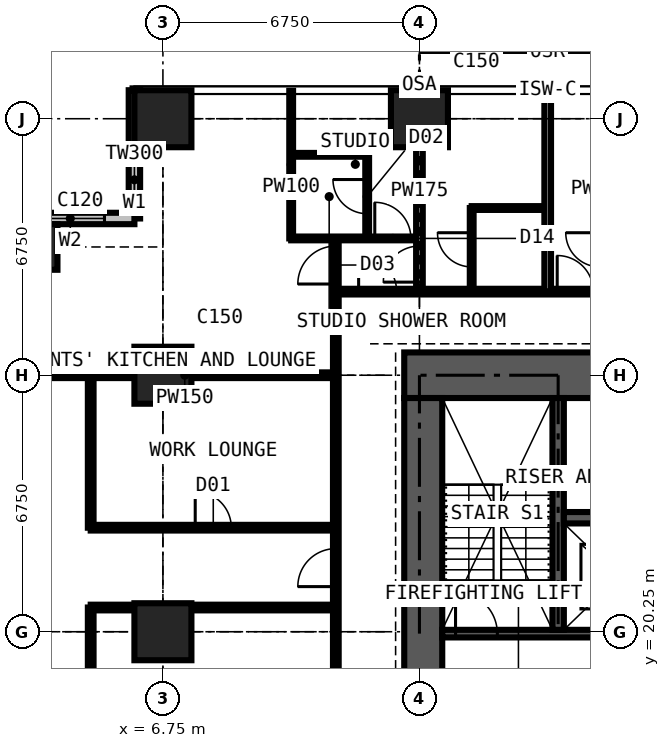
"""IFC4 building model, lengths in metres.
Left out: names, types, materials, properties, quantities, classifications, styles, units other than length and angle.
Written with IfcOpenShell. Run it as: python <this file> out.ifc"""

import sys

from ifc_helpers import new_model, si_unit, direction, frame, frame_2d, origin, origin_2d, place, context, subcontext, project, spatial, rectangle, extrude, element, fill, save


model = new_model("IFC4")
c1 = context("Model", 3, precision=1e-05, world=origin(), true_north=direction((0.0, 1.0)))
c2 = subcontext(c1, "Body", "Model", "MODEL_VIEW")
j1 = project(units=[si_unit("LENGTHUNIT", "METRE"), si_unit("PLANEANGLEUNIT", "RADIAN")], contexts=[c1])
p1 = place(None, origin())
s1 = spatial("IfcSite", under=j1, at=p1, CompositionType="ELEMENT")
p2 = place(p1, origin())
s2 = spatial("IfcBuilding", under=s1, at=p2, CompositionType="ELEMENT")
p3 = place(p2, frame((0.0, 0.0, 167.4)))
s3 = spatial("IfcBuildingStorey", under=s2, at=p3, CompositionType="ELEMENT", Elevation=167.4)
p4 = place(p3, frame((3.375, 30.375, 0.0), z_axis=(0.0, 0.0, 1.0), x_axis=(1.0, 0.0, 0.0)))
e1 = element("IfcColumn", 1, at=p4, inside=s3, PredefinedType="COLUMN", context=c2, shape_type="SweptSolid", body=[
    extrude(rectangle(XDim=1.2, YDim=1.2, at=origin_2d()), origin(), (0.0, 0.0, 1.0), 3.6),
])
for number, where, z_axis, x_axis in (
    (2, (6.75, 20.25, 0.0), (0.0, 0.0, 1.0), (1.0, 0.0, 0.0)),
    (3, (6.75, 27.0, 0.0), (0.0, 0.0, 1.0), (1.0, 0.0, 0.0)),
    (4, (6.75, 33.75, 0.0), (0.0, 0.0, 1.0), (1.0, 0.0, 0.0)),
    (5, (13.5, 33.75, 0.0), (0.0, 0.0, 1.0), (1.0, 0.0, 0.0)),
):
    element("IfcColumn", number, at=place(p3, frame(where, z_axis=z_axis, x_axis=x_axis)), inside=s3, PredefinedType="COLUMN", context=c2, shape_type="SweptSolid", body=[
        extrude(rectangle(XDim=1.5, YDim=1.5, at=origin_2d()), origin(), (0.0, 0.0, 1.0), 3.6),
    ])
p5 = place(p3, frame((27.4, 27.0, 0.0), z_axis=(0.0, 0.0, 1.0), x_axis=(-1.0, 0.0, 0.0)))
e6 = element("IfcWall", 6, at=p5, inside=s3, PredefinedType="SHEAR", context=c2, shape_type="SweptSolid", body=[
    extrude(rectangle(XDim=14.3, YDim=1.2, at=frame_2d((7.15, 0.0))), origin(), (0.0, 0.0, 1.0), 3.6),
])
p6 = place(p5, frame((4.55, 0.0, 0.0)))
e7 = element("IfcOpeningElement", 7, at=p6, cuts=e6, PredefinedType="OPENING", context=c2, shape_type="SweptSolid", body=[
    extrude(rectangle(XDim=0.9, YDim=2.2, at=frame_2d((0.45, 1.1))), frame((0.0, 0.61, 0.0), z_axis=(0.0, -1.0, 0.0), x_axis=(1.0, 0.0, 0.0)), (0.0, 0.0, 1.0), 1.22),
])
p7 = place(p5, frame((7.525, 0.0, 0.0)))
e8 = element("IfcOpeningElement", 8, at=p7, cuts=e6, PredefinedType="OPENING", context=c2, shape_type="SweptSolid", body=[
    extrude(rectangle(XDim=1.0, YDim=2.2, at=frame_2d((0.5, 1.1))), frame((0.0, 0.61, 0.0), z_axis=(0.0, -1.0, 0.0), x_axis=(1.0, 0.0, 0.0)), (0.0, 0.0, 1.0), 1.22),
])
p8 = place(p3, frame((13.6, 26.4, 0.0), z_axis=(0.0, 0.0, 1.0), x_axis=(0.0, -1.0, 0.0)))
e9 = element("IfcWall", 9, at=p8, inside=s3, PredefinedType="SHEAR", context=c2, shape_type="SweptSolid", body=[
    extrude(rectangle(XDim=12.3, YDim=1.0, at=frame_2d((6.15, 0.0))), origin(), (0.0, 0.0, 1.0), 3.6),
])
p9 = place(p8, frame((7.45, 0.0, 0.0)))
e10 = element("IfcOpeningElement", 10, at=p9, cuts=e9, PredefinedType="OPENING", context=c2, shape_type="SweptSolid", body=[
    extrude(rectangle(XDim=1.2, YDim=2.2, at=frame_2d((0.6, 1.1))), frame((0.0, 0.51, 0.0), z_axis=(0.0, -1.0, 0.0), x_axis=(1.0, 0.0, 0.0)), (0.0, 0.0, 1.0), 1.02),
])
p10 = place(p3, frame((6.0, 34.5, 0.0), z_axis=(0.0, 0.0, 1.0), x_axis=(0.0, -1.0, 0.0)))
e11 = element("IfcWall", 11, at=p10, inside=s3, PredefinedType="SOLIDWALL", context=c2, shape_type="SweptSolid", body=[
    extrude(rectangle(XDim=3.375, YDim=0.3, at=frame_2d((1.688, 0.0))), origin(), (0.0, 0.0, 1.0), 3.375),
])
p11 = place(p10, frame((1.607, 0.0, 0.9)))
e12 = element("IfcOpeningElement", 12, at=p11, cuts=e11, PredefinedType="OPENING", context=c2, shape_type="SweptSolid", body=[
    extrude(rectangle(XDim=1.5, YDim=1.8, at=frame_2d((0.75, 0.9))), frame((0.0, 0.16, 0.0), z_axis=(0.0, -1.0, 0.0), x_axis=(1.0, 0.0, 0.0)), (0.0, 0.0, 1.0), 0.32),
])
p12 = place(p3, frame((6.0, 31.125, 0.0), z_axis=(0.0, 0.0, 1.0), x_axis=(-1.0, 0.0, 0.0)))
e13 = element("IfcWall", 13, at=p12, inside=s3, PredefinedType="SOLIDWALL", context=c2, shape_type="SweptSolid", body=[
    extrude(rectangle(XDim=3.375, YDim=0.3, at=frame_2d((1.688, 0.0))), origin(), (0.0, 0.0, 1.0), 3.375),
])
p13 = place(p12, frame((0.788, 0.0, 0.6)))
e14 = element("IfcOpeningElement", 14, at=p13, cuts=e13, PredefinedType="OPENING", context=c2, shape_type="SweptSolid", body=[
    extrude(rectangle(XDim=1.8, YDim=2.1, at=frame_2d((0.9, 1.05))), frame((0.0, 0.16, 0.0), z_axis=(0.0, -1.0, 0.0), x_axis=(1.0, 0.0, 0.0)), (0.0, 0.0, 1.0), 0.32),
])
p14 = place(p3, frame((14.1, 20.2, 0.0), z_axis=(0.0, 0.0, 1.0), x_axis=(1.0, 0.0, 0.0)))
e15 = element("IfcWall", 15, at=p14, inside=s3, PredefinedType="SHEAR", context=c2, shape_type="SweptSolid", body=[
    extrude(rectangle(XDim=12.3, YDim=0.2, at=frame_2d((6.15, 0.0))), origin(), (0.0, 0.0, 1.0), 3.6),
])
p15 = place(p14, frame((4.56, 0.0, 0.0)))
e16 = element("IfcOpeningElement", 16, at=p15, cuts=e15, PredefinedType="OPENING", context=c2, shape_type="SweptSolid", body=[
    extrude(rectangle(XDim=1.1, YDim=2.2, at=frame_2d((0.55, 1.1))), frame((0.0, 0.11, 0.0), z_axis=(0.0, -1.0, 0.0), x_axis=(1.0, 0.0, 0.0)), (0.0, 0.0, 1.0), 0.22),
])
p16 = place(p14, frame((6.7, 0.0, 0.0)))
e17 = element("IfcOpeningElement", 17, at=p16, cuts=e15, PredefinedType="OPENING", context=c2, shape_type="SweptSolid", body=[
    extrude(rectangle(XDim=1.1, YDim=2.2, at=frame_2d((0.55, 1.1))), frame((0.0, 0.11, 0.0), z_axis=(0.0, -1.0, 0.0), x_axis=(1.0, 0.0, 0.0)), (0.0, 0.0, 1.0), 0.22),
])
p17 = place(p14, frame((0.35, 0.0, 0.0)))
e18 = element("IfcOpeningElement", 18, at=p17, cuts=e15, PredefinedType="OPENING", context=c2, shape_type="SweptSolid", body=[
    extrude(rectangle(XDim=1.1, YDim=2.2, at=frame_2d((0.55, 1.1))), frame((0.0, 0.11, 0.0), z_axis=(0.0, -1.0, 0.0), x_axis=(1.0, 0.0, 0.0)), (0.0, 0.0, 1.0), 0.22),
])
p18 = place(p14, frame((9.75, 0.0, 0.0)))
e19 = element("IfcOpeningElement", 19, at=p18, cuts=e15, PredefinedType="OPENING", context=c2, shape_type="SweptSolid", body=[
    extrude(rectangle(XDim=1.1, YDim=2.2, at=frame_2d((0.55, 1.1))), frame((0.0, 0.11, 0.0), z_axis=(0.0, -1.0, 0.0), x_axis=(1.0, 0.0, 0.0)), (0.0, 0.0, 1.0), 0.22),
])
p19 = place(p3, frame((17.15, 20.3, 0.0), z_axis=(0.0, 0.0, 1.0), x_axis=(0.0, 1.0, 0.0)))
e20 = element("IfcWall", 20, at=p19, inside=s3, PredefinedType="SHEAR", context=c2, shape_type="SweptSolid", body=[
    extrude(rectangle(XDim=6.1, YDim=0.3, at=frame_2d((3.05, 0.0))), origin(), (0.0, 0.0, 1.0), 3.6),
])
p20 = place(p3, frame((17.3, 23.25, 0.0), z_axis=(0.0, 0.0, 1.0), x_axis=(1.0, 0.0, 0.0)))
e21 = element("IfcWall", 21, at=p20, inside=s3, PredefinedType="SHEAR", context=c2, shape_type="SweptSolid", body=[
    extrude(rectangle(XDim=5.9, YDim=0.3, at=frame_2d((2.95, 0.0))), origin(), (0.0, 0.0, 1.0), 3.6),
])
p21 = place(p3, frame((3.35, 27.0, 0.0), z_axis=(0.0, 0.0, 1.0), x_axis=(1.0, 0.0, 0.0)))
e22 = element("IfcWall", 22, at=p21, inside=s3, PredefinedType="PARTITIONING", context=c2, shape_type="SweptSolid", body=[
    extrude(rectangle(XDim=7.95, YDim=0.15, at=frame_2d((3.975, 0.0))), origin(), (0.0, 0.0, 1.0), 2.806),
])
p22 = place(p3, frame((4.85, 12.775, 0.0), z_axis=(0.0, 0.0, 1.0), x_axis=(0.0, 1.0, 0.0)))
e23 = element("IfcWall", 23, at=p22, inside=s3, PredefinedType="PARTITIONING", context=c2, shape_type="SweptSolid", body=[
    extrude(rectangle(XDim=8.113, YDim=0.15, at=frame_2d((4.056, 0.0))), origin(), (0.0, 0.0, 1.0), 3.375),
])
p23 = place(p22, frame((3.6, 0.0, 0.0)))
e24 = element("IfcOpeningElement", 24, at=p23, cuts=e23, PredefinedType="OPENING", context=c2, shape_type="SweptSolid", body=[
    extrude(rectangle(XDim=0.95, YDim=2.2, at=frame_2d((0.475, 1.1))), frame((0.0, 0.085, 0.0), z_axis=(0.0, -1.0, 0.0), x_axis=(1.0, 0.0, 0.0)), (0.0, 0.0, 1.0), 0.17),
])
p24 = place(p3, frame((4.85, 20.887, 0.0), z_axis=(0.0, 0.0, 1.0), x_axis=(1.0, 0.0, 0.0)))
e25 = element("IfcWall", 25, at=p24, inside=s3, PredefinedType="PARTITIONING", context=c2, shape_type="SweptSolid", body=[
    extrude(rectangle(XDim=6.45, YDim=0.15, at=frame_2d((3.225, 0.0))), origin(), (0.0, 0.0, 1.0), 3.375),
])
p25 = place(p3, frame((4.85, 22.988, 0.0), z_axis=(0.0, 0.0, 1.0), x_axis=(0.0, 1.0, 0.0)))
e26 = element("IfcWall", 26, at=p25, inside=s3, PredefinedType="PARTITIONING", context=c2, shape_type="SweptSolid", body=[
    extrude(rectangle(XDim=4.012, YDim=0.15, at=frame_2d((2.006, 0.0))), origin(), (0.0, 0.0, 1.0), 3.375),
])
p26 = place(p3, frame((4.85, 22.988, 0.0), z_axis=(0.0, 0.0, 1.0), x_axis=(1.0, 0.0, 0.0)))
e27 = element("IfcWall", 27, at=p26, inside=s3, PredefinedType="PARTITIONING", context=c2, shape_type="SweptSolid", body=[
    extrude(rectangle(XDim=6.45, YDim=0.15, at=frame_2d((3.225, 0.0))), origin(), (0.0, 0.0, 1.0), 3.375),
])
p27 = place(p26, frame((2.75, 0.0, 0.0)))
e28 = element("IfcOpeningElement", 28, at=p27, cuts=e27, PredefinedType="OPENING", context=c2, shape_type="SweptSolid", body=[
    extrude(rectangle(XDim=0.95, YDim=2.2, at=frame_2d((0.475, 1.1))), frame((0.0, 0.085, 0.0), z_axis=(0.0, -1.0, 0.0), x_axis=(1.0, 0.0, 0.0)), (0.0, 0.0, 1.0), 0.17),
])
p28 = place(p3, frame((10.125, 30.6, 0.0), z_axis=(0.0, 0.0, 1.0), x_axis=(0.0, 1.0, 0.0)))
e29 = element("IfcWall", 29, at=p28, inside=s3, PredefinedType="PARTITIONING", context=c2, shape_type="SweptSolid", body=[
    extrude(rectangle(XDim=3.884, YDim=0.1, at=frame_2d((1.942, 0.0))), origin(), (0.0, 0.0, 1.0), 3.375),
])
p29 = place(p3, frame((10.125, 30.6, 0.0), z_axis=(0.0, 0.0, 1.0), x_axis=(1.0, 0.0, 0.0)))
e30 = element("IfcWall", 30, at=p29, inside=s3, PredefinedType="PARTITIONING", context=c2, shape_type="SweptSolid", body=[
    extrude(rectangle(XDim=3.375, YDim=0.1, at=frame_2d((1.688, 0.0))), origin(), (0.0, 0.0, 1.0), 3.375),
])
p30 = place(p29, frame((2.2, 0.0, 0.0)))
e31 = element("IfcOpeningElement", 31, at=p30, cuts=e30, PredefinedType="OPENING", context=c2, shape_type="SweptSolid", body=[
    extrude(rectangle(XDim=0.95, YDim=2.2, at=frame_2d((0.475, 1.1))), frame((0.0, 0.06, 0.0), z_axis=(0.0, -1.0, 0.0), x_axis=(1.0, 0.0, 0.0)), (0.0, 0.0, 1.0), 0.12),
])
p31 = place(p3, frame((10.125, 32.8, 0.0), z_axis=(0.0, 0.0, 1.0), x_axis=(1.0, 0.0, 0.0)))
e32 = element("IfcWall", 32, at=p31, inside=s3, PredefinedType="PARTITIONING", context=c2, shape_type="SweptSolid", body=[
    extrude(rectangle(XDim=2.0, YDim=0.1, at=frame_2d((1.0, 0.0))), origin(), (0.0, 0.0, 1.0), 3.375),
])
p32 = place(p3, frame((11.3, 11.3, 0.0), z_axis=(0.0, 0.0, 1.0), x_axis=(0.0, 1.0, 0.0)))
e33 = element("IfcWall", 33, at=p32, inside=s3, PredefinedType="PARTITIONING", context=c2, shape_type="SweptSolid", body=[
    extrude(rectangle(XDim=19.3, YDim=0.15, at=frame_2d((9.65, 0.0))), origin(), (0.0, 0.0, 1.0), 3.375),
])
p33 = place(p32, frame((18.1, 0.0, 0.0)))
e34 = element("IfcOpeningElement", 34, at=p33, cuts=e33, PredefinedType="OPENING", context=c2, shape_type="SweptSolid", body=[
    extrude(rectangle(XDim=1.0, YDim=2.2, at=frame_2d((0.5, 1.1))), frame((0.0, 0.085, 0.0), z_axis=(0.0, -1.0, 0.0), x_axis=(1.0, 0.0, 0.0)), (0.0, 0.0, 1.0), 0.17),
])
p34 = place(p32, frame((10.137, 0.0, 0.0)))
e35 = element("IfcOpeningElement", 35, at=p34, cuts=e33, PredefinedType="OPENING", context=c2, shape_type="SweptSolid", body=[
    extrude(rectangle(XDim=1.0, YDim=2.2, at=frame_2d((0.5, 1.1))), frame((0.0, 0.085, 0.0), z_axis=(0.0, -1.0, 0.0), x_axis=(1.0, 0.0, 0.0)), (0.0, 0.0, 1.0), 0.17),
])
p35 = place(p3, frame((11.3, 29.2, 0.0), z_axis=(0.0, 0.0, 1.0), x_axis=(1.0, 0.0, 0.0)))
e36 = element("IfcWall", 36, at=p35, inside=s3, PredefinedType="PARTITIONING", context=c2, shape_type="SweptSolid", body=[
    extrude(rectangle(XDim=19.809, YDim=0.15, at=frame_2d((9.904, 0.0))), origin(), (0.0, 0.0, 1.0), 3.375),
])
p36 = place(p35, frame((12.9, 0.0, 0.0)))
e37 = element("IfcOpeningElement", 37, at=p36, cuts=e36, PredefinedType="OPENING", context=c2, shape_type="SweptSolid", body=[
    extrude(rectangle(XDim=1.0, YDim=2.2, at=frame_2d((0.5, 1.1))), frame((0.0, 0.085, 0.0), z_axis=(0.0, -1.0, 0.0), x_axis=(1.0, 0.0, 0.0)), (0.0, 0.0, 1.0), 0.17),
])
p37 = place(p35, frame((5.825, 0.0, 0.0)))
e38 = element("IfcOpeningElement", 38, at=p37, cuts=e36, PredefinedType="OPENING", context=c2, shape_type="SweptSolid", body=[
    extrude(rectangle(XDim=0.95, YDim=2.2, at=frame_2d((0.475, 1.1))), frame((0.0, 0.085, 0.0), z_axis=(0.0, -1.0, 0.0), x_axis=(1.0, 0.0, 0.0)), (0.0, 0.0, 1.0), 0.17),
])
p38 = place(p35, frame((0.6, 0.0, 0.0)))
e39 = element("IfcOpeningElement", 39, at=p38, cuts=e36, PredefinedType="OPENING", context=c2, shape_type="SweptSolid", body=[
    extrude(rectangle(XDim=1.0, YDim=2.2, at=frame_2d((0.5, 1.1))), frame((0.0, 0.085, 0.0), z_axis=(0.0, -1.0, 0.0), x_axis=(1.0, 0.0, 0.0)), (0.0, 0.0, 1.0), 0.17),
])
p39 = place(p3, frame((12.125, 30.6, 0.0), z_axis=(0.0, 0.0, 1.0), x_axis=(0.0, 1.0, 0.0)))
e40 = element("IfcWall", 40, at=p39, inside=s3, PredefinedType="PARTITIONING", context=c2, shape_type="SweptSolid", body=[
    extrude(rectangle(XDim=2.2, YDim=0.1, at=frame_2d((1.1, 0.0))), origin(), (0.0, 0.0, 1.0), 3.375),
])
p40 = place(p39, frame((0.65, 0.0, 0.0)))
e41 = element("IfcOpeningElement", 41, at=p40, cuts=e40, PredefinedType="OPENING", context=c2, shape_type="SweptSolid", body=[
    extrude(rectangle(XDim=0.9, YDim=2.2, at=frame_2d((0.45, 1.1))), frame((0.0, 0.06, 0.0), z_axis=(0.0, -1.0, 0.0), x_axis=(1.0, 0.0, 0.0)), (0.0, 0.0, 1.0), 0.12),
])
p41 = place(p3, frame((13.5, 29.2, 0.0), z_axis=(0.0, 0.0, 1.0), x_axis=(0.0, 1.0, 0.0)))
e42 = element("IfcWall", 42, at=p41, inside=s3, PredefinedType="PARTITIONING", context=c2, shape_type="SweptSolid", body=[
    extrude(rectangle(XDim=5.284, YDim=0.175, at=frame_2d((2.642, 0.0))), origin(), (0.0, 0.0, 1.0), 2.61),
])
p42 = place(p41, frame((0.25, 0.0, 0.0)))
e43 = element("IfcOpeningElement", 43, at=p42, cuts=e42, PredefinedType="OPENING", context=c2, shape_type="SweptSolid", body=[
    extrude(rectangle(XDim=0.95, YDim=2.2, at=frame_2d((0.475, 1.1))), frame((0.0, 0.097, 0.0), z_axis=(0.0, -1.0, 0.0), x_axis=(1.0, 0.0, 0.0)), (0.0, 0.0, 1.0), 0.195),
])
p43 = place(p3, frame((14.875, 29.2, 0.0), z_axis=(0.0, 0.0, 1.0), x_axis=(0.0, 1.0, 0.0)))
e44 = element("IfcWall", 44, at=p43, inside=s3, PredefinedType="PARTITIONING", context=c2, shape_type="SweptSolid", body=[
    extrude(rectangle(XDim=2.2, YDim=0.1, at=frame_2d((1.1, 0.0))), origin(), (0.0, 0.0, 1.0), 3.375),
])
p44 = place(p43, frame((0.65, 0.0, 0.0)))
e45 = element("IfcOpeningElement", 45, at=p44, cuts=e44, PredefinedType="OPENING", context=c2, shape_type="SweptSolid", body=[
    extrude(rectangle(XDim=0.9, YDim=2.2, at=frame_2d((0.45, 1.1))), frame((0.0, 0.06, 0.0), z_axis=(0.0, -1.0, 0.0), x_axis=(1.0, 0.0, 0.0)), (0.0, 0.0, 1.0), 0.12),
])
p45 = place(p3, frame((14.875, 31.4, 0.0), z_axis=(0.0, 0.0, 1.0), x_axis=(1.0, 0.0, 0.0)))
e46 = element("IfcWall", 46, at=p45, inside=s3, PredefinedType="PARTITIONING", context=c2, shape_type="SweptSolid", body=[
    extrude(rectangle(XDim=2.0, YDim=0.1, at=frame_2d((1.0, 0.0))), origin(), (0.0, 0.0, 1.0), 3.375),
])
p46 = place(p3, frame((16.875, 29.2, 0.0), z_axis=(0.0, 0.0, 1.0), x_axis=(0.0, 1.0, 0.0)))
e47 = element("IfcWall", 47, at=p46, inside=s3, PredefinedType="PARTITIONING", context=c2, shape_type="SweptSolid", body=[
    extrude(rectangle(XDim=5.284, YDim=0.175, at=frame_2d((2.642, 0.0))), origin(), (0.0, 0.0, 1.0), 3.375),
])
p47 = place(p11, origin())
e48 = element("IfcWindow", 48, at=p47, inside=s3, PartitioningType="SINGLE_PANEL", PredefinedType="WINDOW", context=c2, shape_type="SweptSolid", body=[
    extrude(rectangle(XDim=1.5, YDim=1.8, at=frame_2d((0.75, 0.9))), frame((0.0, 0.03, 0.0), z_axis=(0.0, -1.0, 0.0), x_axis=(1.0, 0.0, 0.0)), (0.0, 0.0, 1.0), 0.06),
])
fill(e12, e48)
p48 = place(p13, origin())
e49 = element("IfcWindow", 49, at=p48, inside=s3, PartitioningType="SINGLE_PANEL", PredefinedType="WINDOW", context=c2, shape_type="SweptSolid", body=[
    extrude(rectangle(XDim=1.8, YDim=2.1, at=frame_2d((0.9, 1.05))), frame((0.0, 0.03, 0.0), z_axis=(0.0, -1.0, 0.0), x_axis=(1.0, 0.0, 0.0)), (0.0, 0.0, 1.0), 0.06),
])
fill(e14, e49)
p49 = place(p17, origin())
e50 = element("IfcDoor", 50, at=p49, inside=s3, OperationType="SINGLE_SWING_LEFT", PredefinedType="DOOR", context=c2, shape_type="SweptSolid", body=[
    extrude(rectangle(XDim=1.1, YDim=2.2, at=frame_2d((0.55, 1.1))), frame((0.0, 0.025, 0.0), z_axis=(0.0, -1.0, 0.0), x_axis=(1.0, 0.0, 0.0)), (0.0, 0.0, 1.0), 0.05),
])
fill(e18, e50)
p50 = place(p30, origin())
e51 = element("IfcDoor", 51, at=p50, inside=s3, OperationType="SINGLE_SWING_LEFT", PredefinedType="DOOR", context=c2, shape_type="SweptSolid", body=[
    extrude(rectangle(XDim=0.95, YDim=2.2, at=frame_2d((0.475, 1.1))), frame((0.0, 0.025, 0.0), z_axis=(0.0, -1.0, 0.0), x_axis=(1.0, 0.0, 0.0)), (0.0, 0.0, 1.0), 0.05),
])
fill(e31, e51)
p51 = place(p40, origin())
e52 = element("IfcDoor", 52, at=p51, inside=s3, OperationType="SINGLE_SWING_RIGHT", PredefinedType="DOOR", context=c2, shape_type="SweptSolid", body=[
    extrude(rectangle(XDim=0.9, YDim=2.2, at=frame_2d((0.45, 1.1))), frame((0.0, 0.025, 0.0), z_axis=(0.0, -1.0, 0.0), x_axis=(1.0, 0.0, 0.0)), (0.0, 0.0, 1.0), 0.05),
])
fill(e41, e52)
p52 = place(p42, origin())
e53 = element("IfcDoor", 53, at=p52, inside=s3, OperationType="SINGLE_SWING_LEFT", PredefinedType="DOOR", context=c2, shape_type="SweptSolid", body=[
    extrude(rectangle(XDim=0.95, YDim=2.2, at=frame_2d((0.475, 1.1))), frame((0.0, 0.025, 0.0), z_axis=(0.0, -1.0, 0.0), x_axis=(1.0, 0.0, 0.0)), (0.0, 0.0, 1.0), 0.05),
])
fill(e43, e53)
p53 = place(p44, origin())
e54 = element("IfcDoor", 54, at=p53, inside=s3, OperationType="SINGLE_SWING_RIGHT", PredefinedType="DOOR", context=c2, shape_type="SweptSolid", body=[
    extrude(rectangle(XDim=0.9, YDim=2.2, at=frame_2d((0.45, 1.1))), frame((0.0, 0.025, 0.0), z_axis=(0.0, -1.0, 0.0), x_axis=(1.0, 0.0, 0.0)), (0.0, 0.0, 1.0), 0.05),
])
fill(e45, e54)
p54 = place(p37, origin())
e55 = element("IfcDoor", 55, at=p54, inside=s3, OperationType="SINGLE_SWING_LEFT", PredefinedType="DOOR", context=c2, shape_type="SweptSolid", body=[
    extrude(rectangle(XDim=0.95, YDim=2.2, at=frame_2d((0.475, 1.1))), frame((0.0, 0.025, 0.0), z_axis=(0.0, -1.0, 0.0), x_axis=(1.0, 0.0, 0.0)), (0.0, 0.0, 1.0), 0.05),
])
fill(e38, e55)
p55 = place(p38, origin())
e56 = element("IfcDoor", 56, at=p55, inside=s3, OperationType="SINGLE_SWING_LEFT", PredefinedType="DOOR", context=c2, shape_type="SweptSolid", body=[
    extrude(rectangle(XDim=1.0, YDim=2.2, at=frame_2d((0.5, 1.1))), frame((0.0, 0.025, 0.0), z_axis=(0.0, -1.0, 0.0), x_axis=(1.0, 0.0, 0.0)), (0.0, 0.0, 1.0), 0.05),
])
fill(e39, e56)
p56 = place(p33, origin())
e57 = element("IfcDoor", 57, at=p56, inside=s3, OperationType="SINGLE_SWING_LEFT", PredefinedType="DOOR", context=c2, shape_type="SweptSolid", body=[
    extrude(rectangle(XDim=1.0, YDim=2.2, at=frame_2d((0.5, 1.1))), frame((0.0, 0.025, 0.0), z_axis=(0.0, -1.0, 0.0), x_axis=(1.0, 0.0, 0.0)), (0.0, 0.0, 1.0), 0.05),
])
fill(e34, e57)
p57 = place(p34, origin())
e58 = element("IfcDoor", 58, at=p57, inside=s3, OperationType="SINGLE_SWING_LEFT", PredefinedType="DOOR", context=c2, shape_type="SweptSolid", body=[
    extrude(rectangle(XDim=1.0, YDim=2.2, at=frame_2d((0.5, 1.1))), frame((0.0, 0.025, 0.0), z_axis=(0.0, -1.0, 0.0), x_axis=(1.0, 0.0, 0.0)), (0.0, 0.0, 1.0), 0.05),
])
fill(e35, e58)
p58 = place(p27, origin())
e59 = element("IfcDoor", 59, at=p58, inside=s3, OperationType="SINGLE_SWING_LEFT", PredefinedType="DOOR", context=c2, shape_type="SweptSolid", body=[
    extrude(rectangle(XDim=0.95, YDim=2.2, at=frame_2d((0.475, 1.1))), frame((0.0, 0.025, 0.0), z_axis=(0.0, -1.0, 0.0), x_axis=(1.0, 0.0, 0.0)), (0.0, 0.0, 1.0), 0.05),
])
fill(e28, e59)
save(model, sys.argv[1])
